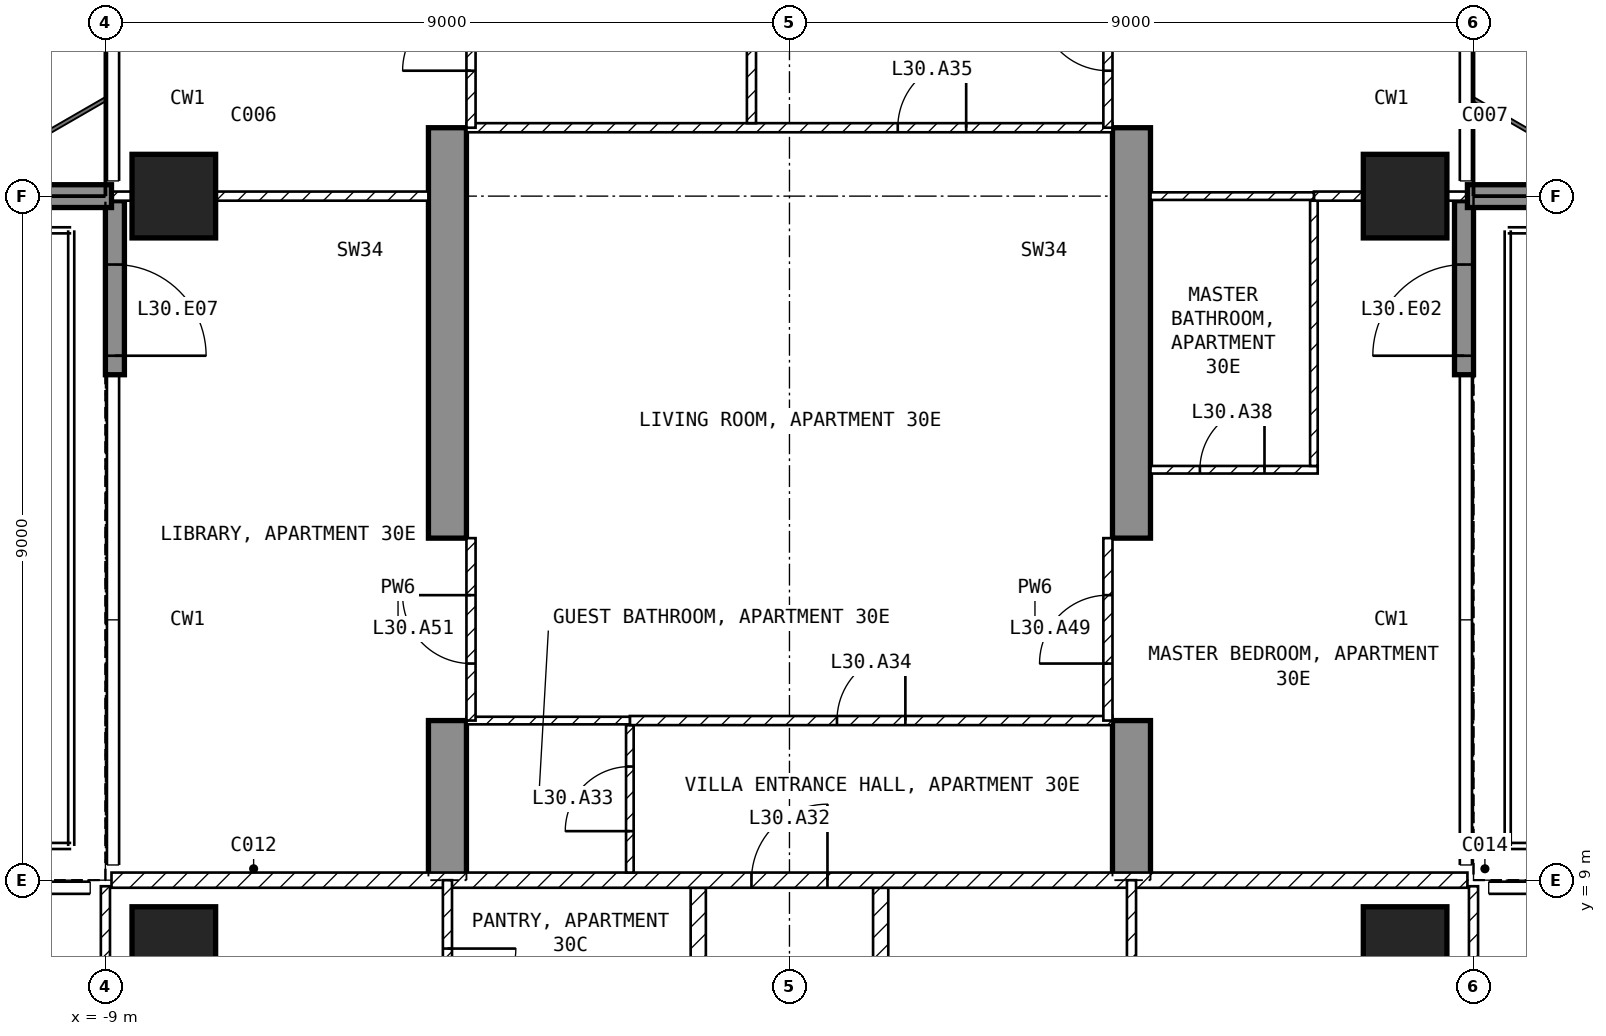
"""IFC4 building model, lengths in metres.
Left out: names, types, materials, properties, quantities, classifications, styles, units other than length and angle.
Written with IfcOpenShell. Run it as: python <this file> out.ifc"""

import sys

from ifc_helpers import new_model, si_unit, direction, frame, frame_2d, origin, origin_2d, place, context, subcontext, project, spatial, polyline, rectangle, outline, extrude, element, fill, save


model = new_model("IFC4")
c1 = context("Model", 3, precision=1e-05, world=origin(), true_north=direction((0.0, 1.0)))
c2 = subcontext(c1, "Body", "Model", "MODEL_VIEW")
j1 = project(units=[si_unit("LENGTHUNIT", "METRE"), si_unit("PLANEANGLEUNIT", "RADIAN")], contexts=[c1])
p1 = place(None, origin())
s1 = spatial("IfcSite", under=j1, at=p1, CompositionType="ELEMENT")
p2 = place(p1, origin())
s2 = spatial("IfcBuilding", under=s1, at=p2, CompositionType="ELEMENT")
p3 = place(p2, frame((0.0, 0.0, 126.9)))
s3 = spatial("IfcBuildingStorey", under=s2, at=p3, CompositionType="ELEMENT", Elevation=126.9)
for number, where, z_axis, x_axis in (
    (1, (-8.1, 8.1, -0.25), (0.0, 0.0, 1.0), (1.0, 0.0, 0.0)),
    (2, (-8.1, 18.0, -0.25), (0.0, 0.0, 1.0), (1.0, 0.0, 0.0)),
    (3, (8.1, 8.1, -0.25), (0.0, 0.0, 1.0), (1.0, 0.0, 0.0)),
    (4, (8.1, 18.0, -0.25), (0.0, 0.0, 1.0), (1.0, 0.0, 0.0)),
):
    element("IfcColumn", number, at=place(p3, frame(where, z_axis=z_axis, x_axis=x_axis)), inside=s3, PredefinedType="COLUMN", context=c2, shape_type="SweptSolid", body=[
        extrude(rectangle(XDim=1.1, YDim=1.1, at=origin_2d()), origin(), (0.0, 0.0, 1.0), 3.5),
    ])
for number, where, z_axis, x_axis in (
    (5, (-4.75, 9.0, -0.25), (1.0, 0.0, 0.0), (0.0, 1.0, 0.0)),
    (6, (4.25, 9.0, -0.25), (1.0, 0.0, 0.0), (0.0, 1.0, 0.0)),
):
    element("IfcWall", number, at=place(p3, frame(where, z_axis=z_axis, x_axis=x_axis)), inside=s3, PredefinedType="SHEAR", context=c2, shape_type="SweptSolid", body=[
        extrude(outline(polyline([(0.0, 0.0), (2.1, 0.0), (2.1, 2.65), (4.5, 2.65), (4.5, 0.0), (9.9, 0.0), (9.9, 2.65), (12.3, 2.65), (12.3, 0.0), (16.55, 0.0), (16.55, 3.5), (0.0, 3.5), (0.0, 0.0)])), origin(), (0.0, 0.0, 1.0), 0.5),
    ])
p4 = place(p3, frame((8.875, 15.65, 0.0), z_axis=(0.0, 0.0, 1.0), x_axis=(0.0, 1.0, 0.0)))
e7 = element("IfcWall", 7, at=p4, inside=s3, PredefinedType="SOLIDWALL", context=c2, shape_type="SweptSolid", body=[
    extrude(rectangle(XDim=2.29, YDim=0.25, at=frame_2d((1.145, 0.0))), origin(), (0.0, 0.0, 1.0), 3.25),
])
p5 = place(p4, frame((0.25, 0.0, 0.0)))
e8 = element("IfcOpeningElement", 8, at=p5, cuts=e7, PredefinedType="OPENING", context=c2, shape_type="SweptSolid", body=[
    extrude(rectangle(XDim=1.2, YDim=2.4, at=frame_2d((0.6, 1.2))), frame((0.0, 0.135, 0.0), z_axis=(0.0, -1.0, 0.0), x_axis=(1.0, 0.0, 0.0)), (0.0, 0.0, 1.0), 0.27),
])
p6 = place(p3, frame((-8.875, 17.94, 0.0), z_axis=(0.0, 0.0, 1.0), x_axis=(0.0, -1.0, 0.0)))
e9 = element("IfcWall", 9, at=p6, inside=s3, PredefinedType="SOLIDWALL", context=c2, shape_type="SweptSolid", body=[
    extrude(rectangle(XDim=2.29, YDim=0.25, at=frame_2d((1.145, 0.0))), origin(), (0.0, 0.0, 1.0), 3.25),
])
p7 = place(p6, frame((0.84, 0.0, 0.0)))
e10 = element("IfcOpeningElement", 10, at=p7, cuts=e9, PredefinedType="OPENING", context=c2, shape_type="SweptSolid", body=[
    extrude(rectangle(XDim=1.2, YDim=2.4, at=frame_2d((0.6, 1.2))), frame((0.0, 0.135, 0.0), z_axis=(0.0, -1.0, 0.0), x_axis=(1.0, 0.0, 0.0)), (0.0, 0.0, 1.0), 0.27),
])
for number, where, z_axis, x_axis in (
    (11, (-8.92, 18.0, 0.0), (0.0, 0.0, 1.0), (-1.0, 0.0, 0.0)),
    (12, (8.92, 18.0, 0.0), (0.0, 0.0, 1.0), (1.0, 0.0, 0.0)),
):
    element("IfcWall", number, at=place(p3, frame(where, z_axis=z_axis, x_axis=x_axis)), inside=s3, PredefinedType="SOLIDWALL", context=c2, shape_type="SweptSolid", body=[
        extrude(rectangle(XDim=2.82, YDim=0.3, at=frame_2d((1.41, 0.0))), origin(), (0.0, 0.0, 1.0), 3.25),
    ])
for number, where, z_axis, x_axis in (
    (13, (1.2, 8.9, 0.0), (0.0, 0.0, 1.0), (0.0, -1.0, 0.0)),
    (14, (-1.2, 4.6, 0.0), (0.0, 0.0, 1.0), (0.0, 1.0, 0.0)),
):
    element("IfcWall", number, at=place(p3, frame(where, z_axis=z_axis, x_axis=x_axis)), inside=s3, PredefinedType="PARTITIONING", context=c2, shape_type="SweptSolid", body=[
        extrude(rectangle(XDim=4.3, YDim=0.2, at=frame_2d((2.15, 0.0))), origin(), (0.0, 0.0, 1.0), 3.25),
    ])
p8 = place(p3, frame((-8.92, 9.0, 0.0), z_axis=(0.0, 0.0, 1.0), x_axis=(1.0, 0.0, 0.0)))
e15 = element("IfcWall", 15, at=p8, inside=s3, PredefinedType="PARTITIONING", context=c2, shape_type="SweptSolid", body=[
    extrude(rectangle(XDim=17.84, YDim=0.2, at=frame_2d((8.92, 0.0))), origin(), (0.0, 0.0, 1.0), 3.25),
])
p9 = place(p8, frame((8.42, 0.0, 0.0)))
e16 = element("IfcOpeningElement", 16, at=p9, cuts=e15, PredefinedType="OPENING", context=c2, shape_type="SweptSolid", body=[
    extrude(rectangle(XDim=1.0, YDim=2.1, at=frame_2d((0.5, 1.05))), frame((0.0, 0.11, 0.0), z_axis=(0.0, -1.0, 0.0), x_axis=(1.0, 0.0, 0.0)), (0.0, 0.0, 1.0), 0.22),
])
p10 = place(p3, frame((9.0, 1.3, 0.0), z_axis=(0.0, 0.0, 1.0), x_axis=(0.0, 1.0, 0.0)))
e17 = element("IfcWall", 17, at=p10, inside=s3, PredefinedType="PARTITIONING", context=c2, shape_type="SweptSolid", body=[
    extrude(rectangle(XDim=7.62, YDim=0.12, at=frame_2d((3.81, 0.0))), origin(), (0.0, 0.0, 1.0), 3.25),
])
p11 = place(p10, frame((3.29, 0.0, 0.0)))
e18 = element("IfcOpeningElement", 18, at=p11, cuts=e17, PredefinedType="OPENING", context=c2, shape_type="SweptSolid", body=[
    extrude(rectangle(XDim=0.9, YDim=2.1, at=frame_2d((0.45, 1.05))), frame((0.0, 0.07, 0.0), z_axis=(0.0, -1.0, 0.0), x_axis=(1.0, 0.0, 0.0)), (0.0, 0.0, 1.0), 0.14),
])
p12 = place(p10, frame((4.65, 0.0, 0.0)))
e19 = element("IfcOpeningElement", 19, at=p12, cuts=e17, PredefinedType="OPENING", context=c2, shape_type="SweptSolid", body=[
    extrude(rectangle(XDim=0.9, YDim=2.1, at=frame_2d((0.45, 1.05))), frame((0.0, 0.07, 0.0), z_axis=(0.0, -1.0, 0.0), x_axis=(1.0, 0.0, 0.0)), (0.0, 0.0, 1.0), 0.14),
])
p13 = place(p3, frame((4.5, 4.5, 0.0), z_axis=(0.0, 0.0, 1.0), x_axis=(0.0, 1.0, 0.0)))
e20 = element("IfcWall", 20, at=p13, inside=s3, PredefinedType="PARTITIONING", context=c2, shape_type="SweptSolid", body=[
    extrude(rectangle(XDim=4.5, YDim=0.12, at=frame_2d((2.25, 0.0))), origin(), (0.0, 0.0, 1.0), 3.25),
])
p14 = place(p13, frame((0.24, 0.0, 0.0)))
e21 = element("IfcOpeningElement", 21, at=p14, cuts=e20, PredefinedType="OPENING", context=c2, shape_type="SweptSolid", body=[
    extrude(rectangle(XDim=0.9, YDim=2.1, at=frame_2d((0.45, 1.05))), frame((0.0, 0.07, 0.0), z_axis=(0.0, -1.0, 0.0), x_axis=(1.0, 0.0, 0.0)), (0.0, 0.0, 1.0), 0.14),
])
p15 = place(p3, frame((-9.0, 8.92, 0.0), z_axis=(0.0, 0.0, 1.0), x_axis=(0.0, -1.0, 0.0)))
e22 = element("IfcWall", 22, at=p15, inside=s3, PredefinedType="PARTITIONING", context=c2, shape_type="SweptSolid", body=[
    extrude(rectangle(XDim=7.62, YDim=0.12, at=frame_2d((3.81, 0.0))), origin(), (0.0, 0.0, 1.0), 3.25),
])
p16 = place(p15, frame((6.32, 0.0, 0.0)))
e23 = element("IfcOpeningElement", 23, at=p16, cuts=e22, PredefinedType="OPENING", context=c2, shape_type="SweptSolid", body=[
    extrude(rectangle(XDim=0.9, YDim=2.1, at=frame_2d((0.45, 1.05))), frame((0.0, 0.07, 0.0), z_axis=(0.0, -1.0, 0.0), x_axis=(1.0, 0.0, 0.0)), (0.0, 0.0, 1.0), 0.14),
])
p17 = place(p3, frame((-4.5, 9.0, 0.0), z_axis=(0.0, 0.0, 1.0), x_axis=(0.0, -1.0, 0.0)))
e24 = element("IfcWall", 24, at=p17, inside=s3, PredefinedType="PARTITIONING", context=c2, shape_type="SweptSolid", body=[
    extrude(rectangle(XDim=2.7, YDim=0.12, at=frame_2d((1.35, 0.0))), origin(), (0.0, 0.0, 1.0), 3.25),
])
p18 = place(p17, frame((0.9, 0.0, 0.0)))
e25 = element("IfcOpeningElement", 25, at=p18, cuts=e24, PredefinedType="OPENING", context=c2, shape_type="SweptSolid", body=[
    extrude(rectangle(XDim=0.9, YDim=2.1, at=frame_2d((0.45, 1.05))), frame((0.0, 0.07, 0.0), z_axis=(0.0, -1.0, 0.0), x_axis=(1.0, 0.0, 0.0)), (0.0, 0.0, 1.0), 0.14),
])
p19 = place(p3, frame((-2.1, 9.1, 0.0), z_axis=(0.0, 0.0, 1.0), x_axis=(0.0, 1.0, 0.0)))
e26 = element("IfcWall", 26, at=p19, inside=s3, PredefinedType="PARTITIONING", context=c2, shape_type="SweptSolid", body=[
    extrude(rectangle(XDim=1.94, YDim=0.1, at=frame_2d((0.97, 0.0))), origin(), (0.0, 0.0, 1.0), 3.25),
])
p20 = place(p19, frame((0.545, 0.0, 0.0)))
e27 = element("IfcOpeningElement", 27, at=p20, cuts=e26, PredefinedType="OPENING", context=c2, shape_type="SweptSolid", body=[
    extrude(rectangle(XDim=0.85, YDim=2.1, at=frame_2d((0.425, 1.05))), frame((0.0, 0.06, 0.0), z_axis=(0.0, -1.0, 0.0), x_axis=(1.0, 0.0, 0.0)), (0.0, 0.0, 1.0), 0.12),
])
p21 = place(p3, frame((-2.1, 11.1, 0.0), z_axis=(0.0, 0.0, 1.0), x_axis=(1.0, 0.0, 0.0)))
e28 = element("IfcWall", 28, at=p21, inside=s3, PredefinedType="PARTITIONING", context=c2, shape_type="SweptSolid", body=[
    extrude(rectangle(XDim=6.35, YDim=0.12, at=frame_2d((3.175, 0.0))), origin(), (0.0, 0.0, 1.0), 3.25),
])
p22 = place(p21, frame((2.725, 0.0, 0.0)))
e29 = element("IfcOpeningElement", 29, at=p22, cuts=e28, PredefinedType="OPENING", context=c2, shape_type="SweptSolid", body=[
    extrude(rectangle(XDim=0.9, YDim=2.1, at=frame_2d((0.45, 1.05))), frame((0.0, 0.07, 0.0), z_axis=(0.0, -1.0, 0.0), x_axis=(1.0, 0.0, 0.0)), (0.0, 0.0, 1.0), 0.14),
])
p23 = place(p3, frame((-4.25, 11.1, 0.0), z_axis=(0.0, 0.0, 1.0), x_axis=(1.0, 0.0, 0.0)))
e30 = element("IfcWall", 30, at=p23, inside=s3, PredefinedType="PARTITIONING", context=c2, shape_type="SweptSolid", body=[
    extrude(rectangle(XDim=2.15, YDim=0.1, at=frame_2d((1.075, 0.0))), origin(), (0.0, 0.0, 1.0), 3.25),
])
p24 = place(p3, frame((-4.25, 18.9, 0.0), z_axis=(0.0, 0.0, 1.0), x_axis=(1.0, 0.0, 0.0)))
e31 = element("IfcWall", 31, at=p24, inside=s3, PredefinedType="PARTITIONING", context=c2, shape_type="SweptSolid", body=[
    extrude(rectangle(XDim=8.5, YDim=0.12, at=frame_2d((4.25, 0.0))), origin(), (0.0, 0.0, 1.0), 3.25),
])
p25 = place(p24, frame((5.675, 0.0, 0.0)))
e32 = element("IfcOpeningElement", 32, at=p25, cuts=e31, PredefinedType="OPENING", context=c2, shape_type="SweptSolid", body=[
    extrude(rectangle(XDim=0.9, YDim=2.1, at=frame_2d((0.45, 1.05))), frame((0.0, 0.07, 0.0), z_axis=(0.0, -1.0, 0.0), x_axis=(1.0, 0.0, 0.0)), (0.0, 0.0, 1.0), 0.14),
])
p26 = place(p3, frame((-0.5, 18.96, 0.0), z_axis=(0.0, 0.0, 1.0), x_axis=(0.0, 1.0, 0.0)))
e33 = element("IfcWall", 33, at=p26, inside=s3, PredefinedType="PARTITIONING", context=c2, shape_type="SweptSolid", body=[
    extrude(rectangle(XDim=4.38, YDim=0.12, at=frame_2d((2.19, 0.0))), origin(), (0.0, 0.0, 1.0), 3.25),
])
p27 = place(p26, frame((1.74, 0.0, 0.0)))
e34 = element("IfcOpeningElement", 34, at=p27, cuts=e33, PredefinedType="OPENING", context=c2, shape_type="SweptSolid", body=[
    extrude(rectangle(XDim=0.9, YDim=2.1, at=frame_2d((0.45, 1.05))), frame((0.0, 0.07, 0.0), z_axis=(0.0, -1.0, 0.0), x_axis=(1.0, 0.0, 0.0)), (0.0, 0.0, 1.0), 0.14),
])
p28 = place(p3, frame((4.75, 14.4, 0.0), z_axis=(0.0, 0.0, 1.0), x_axis=(1.0, 0.0, 0.0)))
e35 = element("IfcWall", 35, at=p28, inside=s3, PredefinedType="PARTITIONING", context=c2, shape_type="SweptSolid", body=[
    extrude(rectangle(XDim=2.2, YDim=0.1, at=frame_2d((1.1, 0.0))), origin(), (0.0, 0.0, 1.0), 3.25),
])
p29 = place(p28, frame((0.65, 0.0, 0.0)))
e36 = element("IfcOpeningElement", 36, at=p29, cuts=e35, PredefinedType="OPENING", context=c2, shape_type="SweptSolid", body=[
    extrude(rectangle(XDim=0.85, YDim=2.1, at=frame_2d((0.425, 1.05))), frame((0.0, 0.06, 0.0), z_axis=(0.0, -1.0, 0.0), x_axis=(1.0, 0.0, 0.0)), (0.0, 0.0, 1.0), 0.12),
])
p30 = place(p3, frame((6.9, 14.45, 0.0), z_axis=(0.0, 0.0, 1.0), x_axis=(0.0, 1.0, 0.0)))
e37 = element("IfcWall", 37, at=p30, inside=s3, PredefinedType="PARTITIONING", context=c2, shape_type="SweptSolid", body=[
    extrude(rectangle(XDim=3.49, YDim=0.1, at=frame_2d((1.745, 0.0))), origin(), (0.0, 0.0, 1.0), 3.25),
])
p31 = place(p3, frame((6.9, 18.0, 0.0), z_axis=(0.0, 0.0, 1.0), x_axis=(1.0, 0.0, 0.0)))
e38 = element("IfcWall", 38, at=p31, inside=s3, PredefinedType="PARTITIONING", context=c2, shape_type="SweptSolid", body=[
    extrude(rectangle(XDim=2.02, YDim=0.12, at=frame_2d((1.01, 0.0))), origin(), (0.0, 0.0, 1.0), 2.414),
])
p32 = place(p3, frame((4.75, 18.0, 0.0), z_axis=(0.0, 0.0, 1.0), x_axis=(1.0, 0.0, 0.0)))
e39 = element("IfcWall", 39, at=p32, inside=s3, PredefinedType="PARTITIONING", context=c2, shape_type="SweptSolid", body=[
    extrude(rectangle(XDim=2.15, YDim=0.1, at=frame_2d((1.075, 0.0))), origin(), (0.0, 0.0, 1.0), 2.414),
])
p33 = place(p3, frame((-8.92, 18.0, 0.0), z_axis=(0.0, 0.0, 1.0), x_axis=(1.0, 0.0, 0.0)))
e40 = element("IfcWall", 40, at=p33, inside=s3, PredefinedType="PARTITIONING", context=c2, shape_type="SweptSolid", body=[
    extrude(rectangle(XDim=4.17, YDim=0.12, at=frame_2d((2.085, 0.0))), origin(), (0.0, 0.0, 1.0), 2.414),
])
p34 = place(p3, frame((4.19, 11.1, 0.0), z_axis=(0.0, 0.0, 1.0), x_axis=(0.0, 1.0, 0.0)))
e41 = element("IfcWall", 41, at=p34, inside=s3, PredefinedType="PARTITIONING", context=c2, shape_type="SweptSolid", body=[
    extrude(rectangle(XDim=2.4, YDim=0.12, at=frame_2d((1.2, 0.0))), origin(), (0.0, 0.0, 1.0), 2.4),
])
p35 = place(p34, frame((0.75, 0.0, 0.0)))
e42 = element("IfcOpeningElement", 42, at=p35, cuts=e41, PredefinedType="OPENING", context=c2, shape_type="SweptSolid", body=[
    extrude(rectangle(XDim=0.9, YDim=2.1, at=frame_2d((0.45, 1.05))), frame((0.0, 0.07, 0.0), z_axis=(0.0, -1.0, 0.0), x_axis=(1.0, 0.0, 0.0)), (0.0, 0.0, 1.0), 0.14),
])
p36 = place(p3, frame((4.19, 18.9, 0.0), z_axis=(0.0, 0.0, 1.0), x_axis=(0.0, 1.0, 0.0)))
e43 = element("IfcWall", 43, at=p36, inside=s3, PredefinedType="PARTITIONING", context=c2, shape_type="SweptSolid", body=[
    extrude(rectangle(XDim=2.4, YDim=0.12, at=frame_2d((1.2, 0.0))), origin(), (0.0, 0.0, 1.0), 2.4),
])
p37 = place(p36, frame((0.75, 0.0, 0.0)))
e44 = element("IfcOpeningElement", 44, at=p37, cuts=e43, PredefinedType="OPENING", context=c2, shape_type="SweptSolid", body=[
    extrude(rectangle(XDim=0.9, YDim=2.1, at=frame_2d((0.45, 1.05))), frame((0.0, 0.07, 0.0), z_axis=(0.0, -1.0, 0.0), x_axis=(1.0, 0.0, 0.0)), (0.0, 0.0, 1.0), 0.14),
])
p38 = place(p3, frame((-4.19, 11.1, 0.0), z_axis=(0.0, 0.0, 1.0), x_axis=(0.0, 1.0, 0.0)))
e45 = element("IfcWall", 45, at=p38, inside=s3, PredefinedType="PARTITIONING", context=c2, shape_type="SweptSolid", body=[
    extrude(rectangle(XDim=2.4, YDim=0.12, at=frame_2d((1.2, 0.0))), origin(), (0.0, 0.0, 1.0), 2.4),
])
p39 = place(p38, frame((0.75, 0.0, 0.0)))
e46 = element("IfcOpeningElement", 46, at=p39, cuts=e45, PredefinedType="OPENING", context=c2, shape_type="SweptSolid", body=[
    extrude(rectangle(XDim=0.9, YDim=2.1, at=frame_2d((0.45, 1.05))), frame((0.0, 0.07, 0.0), z_axis=(0.0, -1.0, 0.0), x_axis=(1.0, 0.0, 0.0)), (0.0, 0.0, 1.0), 0.14),
])
p40 = place(p3, frame((-4.19, 18.9, 0.0), z_axis=(0.0, 0.0, 1.0), x_axis=(0.0, 1.0, 0.0)))
e47 = element("IfcWall", 47, at=p40, inside=s3, PredefinedType="PARTITIONING", context=c2, shape_type="SweptSolid", body=[
    extrude(rectangle(XDim=2.4, YDim=0.12, at=frame_2d((1.2, 0.0))), origin(), (0.0, 0.0, 1.0), 2.4),
])
p41 = place(p40, frame((0.75, 0.0, 0.0)))
e48 = element("IfcOpeningElement", 48, at=p41, cuts=e47, PredefinedType="OPENING", context=c2, shape_type="SweptSolid", body=[
    extrude(rectangle(XDim=0.9, YDim=2.1, at=frame_2d((0.45, 1.05))), frame((0.0, 0.07, 0.0), z_axis=(0.0, -1.0, 0.0), x_axis=(1.0, 0.0, 0.0)), (0.0, 0.0, 1.0), 0.14),
])
p42 = place(p5, origin())
e49 = element("IfcDoor", 49, at=p42, inside=s3, OperationType="SINGLE_SWING_LEFT", PredefinedType="DOOR", context=c2, shape_type="SweptSolid", body=[
    extrude(rectangle(XDim=1.2, YDim=2.4, at=frame_2d((0.6, 1.2))), frame((0.0, 0.025, 0.0), z_axis=(0.0, -1.0, 0.0), x_axis=(1.0, 0.0, 0.0)), (0.0, 0.0, 1.0), 0.05),
])
fill(e8, e49)
p43 = place(p7, origin())
e50 = element("IfcDoor", 50, at=p43, inside=s3, OperationType="SINGLE_SWING_RIGHT", PredefinedType="DOOR", context=c2, shape_type="SweptSolid", body=[
    extrude(rectangle(XDim=1.2, YDim=2.4, at=frame_2d((0.6, 1.2))), frame((0.0, 0.025, 0.0), z_axis=(0.0, -1.0, 0.0), x_axis=(1.0, 0.0, 0.0)), (0.0, 0.0, 1.0), 0.05),
])
fill(e10, e50)
p44 = place(p18, origin())
e51 = element("IfcDoor", 51, at=p44, inside=s3, OperationType="SINGLE_SWING_LEFT", PredefinedType="DOOR", context=c2, shape_type="SweptSolid", body=[
    extrude(rectangle(XDim=0.9, YDim=2.1, at=frame_2d((0.45, 1.05))), frame((0.0, 0.025, 0.0), z_axis=(0.0, -1.0, 0.0), x_axis=(1.0, 0.0, 0.0)), (0.0, 0.0, 1.0), 0.05),
])
fill(e25, e51)
p45 = place(p9, origin())
e52 = element("IfcDoor", 52, at=p45, inside=s3, OperationType="SINGLE_SWING_RIGHT", PredefinedType="DOOR", context=c2, shape_type="SweptSolid", body=[
    extrude(rectangle(XDim=1.0, YDim=2.1, at=frame_2d((0.5, 1.05))), frame((0.0, 0.025, 0.0), z_axis=(0.0, -1.0, 0.0), x_axis=(1.0, 0.0, 0.0)), (0.0, 0.0, 1.0), 0.05),
])
fill(e16, e52)
p46 = place(p20, origin())
e53 = element("IfcDoor", 53, at=p46, inside=s3, OperationType="SINGLE_SWING_LEFT", PredefinedType="DOOR", context=c2, shape_type="SweptSolid", body=[
    extrude(rectangle(XDim=0.85, YDim=2.1, at=frame_2d((0.425, 1.05))), frame((0.0, 0.025, 0.0), z_axis=(0.0, -1.0, 0.0), x_axis=(1.0, 0.0, 0.0)), (0.0, 0.0, 1.0), 0.05),
])
fill(e27, e53)
p47 = place(p22, origin())
e54 = element("IfcDoor", 54, at=p47, inside=s3, OperationType="SINGLE_SWING_RIGHT", PredefinedType="DOOR", context=c2, shape_type="SweptSolid", body=[
    extrude(rectangle(XDim=0.9, YDim=2.1, at=frame_2d((0.45, 1.05))), frame((0.0, 0.025, 0.0), z_axis=(0.0, -1.0, 0.0), x_axis=(1.0, 0.0, 0.0)), (0.0, 0.0, 1.0), 0.05),
])
fill(e29, e54)
p48 = place(p25, origin())
e55 = element("IfcDoor", 55, at=p48, inside=s3, OperationType="SINGLE_SWING_RIGHT", PredefinedType="DOOR", context=c2, shape_type="SweptSolid", body=[
    extrude(rectangle(XDim=0.9, YDim=2.1, at=frame_2d((0.45, 1.05))), frame((0.0, 0.025, 0.0), z_axis=(0.0, -1.0, 0.0), x_axis=(1.0, 0.0, 0.0)), (0.0, 0.0, 1.0), 0.05),
])
fill(e32, e55)
p49 = place(p29, origin())
e56 = element("IfcDoor", 56, at=p49, inside=s3, OperationType="SINGLE_SWING_RIGHT", PredefinedType="DOOR", context=c2, shape_type="SweptSolid", body=[
    extrude(rectangle(XDim=0.85, YDim=2.1, at=frame_2d((0.425, 1.05))), frame((0.0, 0.025, 0.0), z_axis=(0.0, -1.0, 0.0), x_axis=(1.0, 0.0, 0.0)), (0.0, 0.0, 1.0), 0.05),
])
fill(e36, e56)
p50 = place(p35, origin())
e57 = element("IfcDoor", 57, at=p50, inside=s3, OperationType="SINGLE_SWING_LEFT", PredefinedType="DOOR", context=c2, shape_type="SweptSolid", body=[
    extrude(rectangle(XDim=0.9, YDim=2.1, at=frame_2d((0.45, 1.05))), frame((0.0, 0.025, 0.0), z_axis=(0.0, -1.0, 0.0), x_axis=(1.0, 0.0, 0.0)), (0.0, 0.0, 1.0), 0.05),
])
fill(e42, e57)
p51 = place(p37, origin())
e58 = element("IfcDoor", 58, at=p51, inside=s3, OperationType="SINGLE_SWING_RIGHT", PredefinedType="DOOR", context=c2, shape_type="SweptSolid", body=[
    extrude(rectangle(XDim=0.9, YDim=2.1, at=frame_2d((0.45, 1.05))), frame((0.0, 0.025, 0.0), z_axis=(0.0, -1.0, 0.0), x_axis=(1.0, 0.0, 0.0)), (0.0, 0.0, 1.0), 0.05),
])
fill(e44, e58)
p52 = place(p39, origin())
e59 = element("IfcDoor", 59, at=p52, inside=s3, OperationType="SINGLE_SWING_RIGHT", PredefinedType="DOOR", context=c2, shape_type="SweptSolid", body=[
    extrude(rectangle(XDim=0.9, YDim=2.1, at=frame_2d((0.45, 1.05))), frame((0.0, 0.025, 0.0), z_axis=(0.0, -1.0, 0.0), x_axis=(1.0, 0.0, 0.0)), (0.0, 0.0, 1.0), 0.05),
])
fill(e46, e59)
p53 = place(p41, origin())
e60 = element("IfcDoor", 60, at=p53, inside=s3, OperationType="SINGLE_SWING_LEFT", PredefinedType="DOOR", context=c2, shape_type="SweptSolid", body=[
    extrude(rectangle(XDim=0.9, YDim=2.1, at=frame_2d((0.45, 1.05))), frame((0.0, 0.025, 0.0), z_axis=(0.0, -1.0, 0.0), x_axis=(1.0, 0.0, 0.0)), (0.0, 0.0, 1.0), 0.05),
])
fill(e48, e60)
save(model, sys.argv[1])
